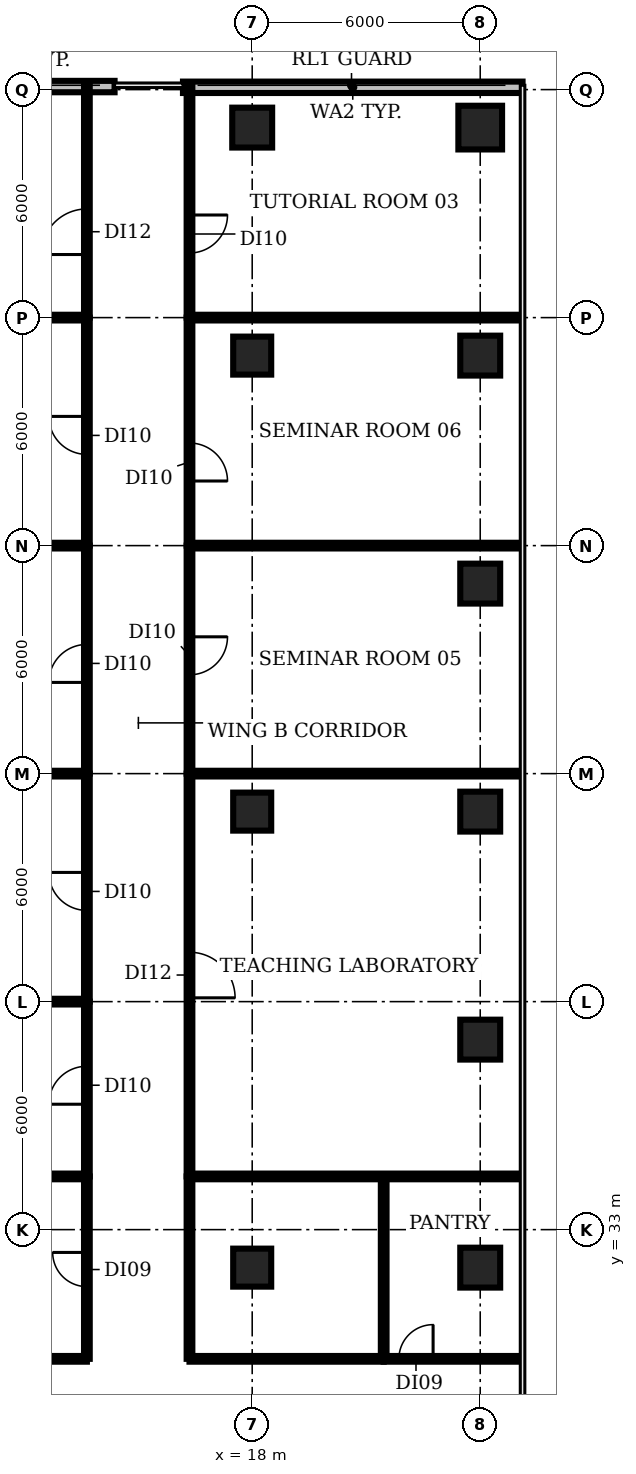
"""IFC4 building model, lengths in metres.
Left out: names, types, materials, properties, quantities, classifications, styles, units other than length and angle.
Written with IfcOpenShell. Run it as: python <this file> out.ifc"""

import sys

from ifc_helpers import new_model, si_unit, direction, frame, frame_2d, origin, origin_2d, place, context, subcontext, project, spatial, rectangle, circle, extrude, element, fill, save


model = new_model("IFC4")
c1 = context("Model", 3, precision=1e-05, world=origin(), true_north=direction((0.0, 1.0)))
c2 = subcontext(c1, "Body", "Model", "MODEL_VIEW")
j1 = project(units=[si_unit("LENGTHUNIT", "METRE"), si_unit("PLANEANGLEUNIT", "RADIAN")], contexts=[c1])
p1 = place(None, origin())
s1 = spatial("IfcSite", under=j1, at=p1, CompositionType="ELEMENT")
p2 = place(p1, origin())
s2 = spatial("IfcBuilding", under=s1, at=p2, CompositionType="ELEMENT")
p3 = place(p2, frame((0.0, 0.0, 75.2)))
s3 = spatial("IfcBuildingStorey", under=s2, at=p3, CompositionType="ELEMENT", Elevation=75.2)
for number, where, z_axis, x_axis in (
    (1, (18.0, 32.0, 0.0), (0.0, 0.0, 1.0), (1.0, 0.0, 0.0)),
    (2, (18.0, 44.0, 0.0), (0.0, 0.0, 1.0), (1.0, 0.0, 0.0)),
    (3, (18.0, 56.0, 0.0), (0.0, 0.0, 1.0), (1.0, 0.0, 0.0)),
):
    element("IfcColumn", number, at=place(p3, frame(where, z_axis=z_axis, x_axis=x_axis)), inside=s3, PredefinedType="COLUMN", context=c2, shape_type="SweptSolid", body=[
        extrude(rectangle(XDim=1.0, YDim=1.0, at=origin_2d()), origin(), (0.0, 0.0, 1.0), 3.2),
    ])
for number, where, z_axis, x_axis in (
    (4, (18.0, 62.0, 0.0), (0.0, 0.0, 1.0), (1.0, 0.0, 0.0)),
    (5, (24.0, 32.0, 0.0), (0.0, 0.0, 1.0), (1.0, 0.0, 0.0)),
    (6, (24.0, 38.0, 0.0), (0.0, 0.0, 1.0), (1.0, 0.0, 0.0)),
    (7, (24.0, 44.0, 0.0), (0.0, 0.0, 1.0), (1.0, 0.0, 0.0)),
    (8, (24.0, 50.0, 0.0), (0.0, 0.0, 1.0), (1.0, 0.0, 0.0)),
    (9, (24.0, 56.0, 0.0), (0.0, 0.0, 1.0), (1.0, 0.0, 0.0)),
):
    element("IfcColumn", number, at=place(p3, frame(where, z_axis=z_axis, x_axis=x_axis)), inside=s3, PredefinedType="COLUMN", context=c2, shape_type="SweptSolid", body=[
        extrude(rectangle(XDim=1.05, YDim=1.05, at=origin_2d()), origin(), (0.0, 0.0, 1.0), 3.2),
    ])
p4 = place(p3, frame((24.0, 62.0, 0.0), z_axis=(0.0, 0.0, 1.0), x_axis=(1.0, 0.0, 0.0)))
e10 = element("IfcColumn", 10, at=p4, inside=s3, PredefinedType="COLUMN", context=c2, shape_type="SweptSolid", body=[
    extrude(circle(Radius=0.575, at=origin_2d()), origin(), (0.0, 0.0, 1.0), 3.2),
])
p5 = place(p3, frame((25.114, 63.061, 0.0), z_axis=(0.0, 0.0, 1.0), x_axis=(-1.0, 0.0, 0.0)))
e11 = element("IfcWall", 11, at=p5, inside=s3, PredefinedType="SOLIDWALL", context=c2, shape_type="SweptSolid", body=[
    extrude(rectangle(XDim=8.936, YDim=0.3, at=frame_2d((4.468, 0.0))), origin(), (0.0, 0.0, 1.0), 3.8),
])
p6 = place(p3, frame((14.378, 63.08, 0.0), z_axis=(0.0, 0.0, 1.0), x_axis=(-1.0, 0.0, 0.0)))
e12 = element("IfcWall", 12, at=p6, inside=s3, PredefinedType="SOLIDWALL", context=c2, shape_type="SweptSolid", body=[
    extrude(rectangle(XDim=4.757, YDim=0.3, at=frame_2d((2.378, 0.0))), origin(), (0.0, 0.0, 1.0), 3.8),
])
p7 = place(p3, frame((-4.35, 57.0, 0.0), z_axis=(0.0, 0.0, 1.0), x_axis=(1.0, 0.0, 0.0)))
e13 = element("IfcWall", 13, at=p7, inside=s3, PredefinedType="PARTITIONING", context=c2, shape_type="SweptSolid", body=[
    extrude(rectangle(XDim=18.0, YDim=0.15, at=frame_2d((9.0, 0.0))), origin(), (0.0, 0.0, 1.0), 2.78),
])
p8 = place(p3, frame((-3.77, 51.0, 0.0), z_axis=(0.0, 0.0, 1.0), x_axis=(1.0, 0.0, 0.0)))
e14 = element("IfcWall", 14, at=p8, inside=s3, PredefinedType="PARTITIONING", context=c2, shape_type="SweptSolid", body=[
    extrude(rectangle(XDim=17.42, YDim=0.15, at=frame_2d((8.71, 0.0))), origin(), (0.0, 0.0, 1.0), 2.78),
])
p9 = place(p3, frame((-3.19, 45.0, 0.0), z_axis=(0.0, 0.0, 1.0), x_axis=(1.0, 0.0, 0.0)))
e15 = element("IfcWall", 15, at=p9, inside=s3, PredefinedType="PARTITIONING", context=c2, shape_type="SweptSolid", body=[
    extrude(rectangle(XDim=16.84, YDim=0.15, at=frame_2d((8.42, 0.0))), origin(), (0.0, 0.0, 1.0), 2.78),
])
p10 = place(p3, frame((-2.61, 39.0, 0.0), z_axis=(0.0, 0.0, 1.0), x_axis=(1.0, 0.0, 0.0)))
e16 = element("IfcWall", 16, at=p10, inside=s3, PredefinedType="PARTITIONING", context=c2, shape_type="SweptSolid", body=[
    extrude(rectangle(XDim=16.26, YDim=0.15, at=frame_2d((8.13, 0.0))), origin(), (0.0, 0.0, 1.0), 2.78),
])
p11 = place(p3, frame((-2.17, 34.4, 0.0), z_axis=(0.0, 0.0, 1.0), x_axis=(1.0, 0.0, 0.0)))
e17 = element("IfcWall", 17, at=p11, inside=s3, PredefinedType="PARTITIONING", context=c2, shape_type="SweptSolid", body=[
    extrude(rectangle(XDim=15.82, YDim=0.15, at=frame_2d((7.91, 0.0))), origin(), (0.0, 0.0, 1.0), 2.78),
])
p12 = place(p3, frame((8.8, 29.6, 0.0), z_axis=(0.0, 0.0, 1.0), x_axis=(1.0, 0.0, 0.0)))
e18 = element("IfcWall", 18, at=p12, inside=s3, PredefinedType="PARTITIONING", context=c2, shape_type="SweptSolid", body=[
    extrude(rectangle(XDim=4.85, YDim=0.15, at=frame_2d((2.425, 0.0))), origin(), (0.0, 0.0, 1.0), 2.78),
])
p13 = place(p3, frame((13.65, 29.6, 0.0), z_axis=(0.0, 0.0, 1.0), x_axis=(0.0, 1.0, 0.0)))
e19 = element("IfcWall", 19, at=p13, inside=s3, PredefinedType="PARTITIONING", context=c2, shape_type="SweptSolid", body=[
    extrude(rectangle(XDim=4.8, YDim=0.15, at=frame_2d((2.4, 0.0))), origin(), (0.0, 0.0, 1.0), 2.78),
])
p14 = place(p13, frame((1.9, 0.0, 0.0)))
e20 = element("IfcOpeningElement", 20, at=p14, cuts=e19, PredefinedType="OPENING", context=c2, shape_type="SweptSolid", body=[
    extrude(rectangle(XDim=0.9, YDim=2.1, at=frame_2d((0.45, 1.05))), frame((0.0, 0.085, 0.0), z_axis=(0.0, -1.0, 0.0), x_axis=(1.0, 0.0, 0.0)), (0.0, 0.0, 1.0), 0.17),
])
p15 = place(p3, frame((13.65, 34.4, 0.0), z_axis=(0.0, 0.0, 1.0), x_axis=(0.0, 1.0, 0.0)))
e21 = element("IfcWall", 21, at=p15, inside=s3, PredefinedType="PARTITIONING", context=c2, shape_type="SweptSolid", body=[
    extrude(rectangle(XDim=4.6, YDim=0.15, at=frame_2d((2.3, 0.0))), origin(), (0.0, 0.0, 1.0), 2.78),
])
p16 = place(p15, frame((1.9, 0.0, 0.0)))
e22 = element("IfcOpeningElement", 22, at=p16, cuts=e21, PredefinedType="OPENING", context=c2, shape_type="SweptSolid", body=[
    extrude(rectangle(XDim=1.0, YDim=2.1, at=frame_2d((0.5, 1.05))), frame((0.0, 0.085, 0.0), z_axis=(0.0, -1.0, 0.0), x_axis=(1.0, 0.0, 0.0)), (0.0, 0.0, 1.0), 0.17),
])
p17 = place(p3, frame((13.65, 39.0, 0.0), z_axis=(0.0, 0.0, 1.0), x_axis=(0.0, 1.0, 0.0)))
e23 = element("IfcWall", 23, at=p17, inside=s3, PredefinedType="PARTITIONING", context=c2, shape_type="SweptSolid", body=[
    extrude(rectangle(XDim=6.0, YDim=0.15, at=frame_2d((3.0, 0.0))), origin(), (0.0, 0.0, 1.0), 2.78),
])
p18 = place(p17, frame((2.4, 0.0, 0.0)))
e24 = element("IfcOpeningElement", 24, at=p18, cuts=e23, PredefinedType="OPENING", context=c2, shape_type="SweptSolid", body=[
    extrude(rectangle(XDim=1.0, YDim=2.1, at=frame_2d((0.5, 1.05))), frame((0.0, 0.085, 0.0), z_axis=(0.0, -1.0, 0.0), x_axis=(1.0, 0.0, 0.0)), (0.0, 0.0, 1.0), 0.17),
])
p19 = place(p3, frame((13.65, 45.0, 0.0), z_axis=(0.0, 0.0, 1.0), x_axis=(0.0, 1.0, 0.0)))
e25 = element("IfcWall", 25, at=p19, inside=s3, PredefinedType="PARTITIONING", context=c2, shape_type="SweptSolid", body=[
    extrude(rectangle(XDim=6.0, YDim=0.15, at=frame_2d((3.0, 0.0))), origin(), (0.0, 0.0, 1.0), 2.78),
])
p20 = place(p19, frame((2.4, 0.0, 0.0)))
e26 = element("IfcOpeningElement", 26, at=p20, cuts=e25, PredefinedType="OPENING", context=c2, shape_type="SweptSolid", body=[
    extrude(rectangle(XDim=1.0, YDim=2.1, at=frame_2d((0.5, 1.05))), frame((0.0, 0.085, 0.0), z_axis=(0.0, -1.0, 0.0), x_axis=(1.0, 0.0, 0.0)), (0.0, 0.0, 1.0), 0.17),
])
p21 = place(p3, frame((13.65, 51.0, 0.0), z_axis=(0.0, 0.0, 1.0), x_axis=(0.0, 1.0, 0.0)))
e27 = element("IfcWall", 27, at=p21, inside=s3, PredefinedType="PARTITIONING", context=c2, shape_type="SweptSolid", body=[
    extrude(rectangle(XDim=6.0, YDim=0.15, at=frame_2d((3.0, 0.0))), origin(), (0.0, 0.0, 1.0), 2.78),
])
p22 = place(p21, frame((2.4, 0.0, 0.0)))
e28 = element("IfcOpeningElement", 28, at=p22, cuts=e27, PredefinedType="OPENING", context=c2, shape_type="SweptSolid", body=[
    extrude(rectangle(XDim=1.0, YDim=2.1, at=frame_2d((0.5, 1.05))), frame((0.0, 0.085, 0.0), z_axis=(0.0, -1.0, 0.0), x_axis=(1.0, 0.0, 0.0)), (0.0, 0.0, 1.0), 0.17),
])
p23 = place(p3, frame((13.65, 57.0, 0.0), z_axis=(0.0, 0.0, 1.0), x_axis=(0.0, 1.0, 0.0)))
e29 = element("IfcWall", 29, at=p23, inside=s3, PredefinedType="PARTITIONING", context=c2, shape_type="SweptSolid", body=[
    extrude(rectangle(XDim=6.174, YDim=0.15, at=frame_2d((3.087, 0.0))), origin(), (0.0, 0.0, 1.0), 2.78),
])
p24 = place(p23, frame((1.66, 0.0, 0.0)))
e30 = element("IfcOpeningElement", 30, at=p24, cuts=e29, PredefinedType="OPENING", context=c2, shape_type="SweptSolid", body=[
    extrude(rectangle(XDim=1.2, YDim=2.1, at=frame_2d((0.6, 1.05))), frame((0.0, 0.085, 0.0), z_axis=(0.0, -1.0, 0.0), x_axis=(1.0, 0.0, 0.0)), (0.0, 0.0, 1.0), 0.17),
])
p25 = place(p3, frame((16.35, 29.6, 0.0), z_axis=(0.0, 0.0, 1.0), x_axis=(0.0, 1.0, 0.0)))
e31 = element("IfcWall", 31, at=p25, inside=s3, PredefinedType="PARTITIONING", context=c2, shape_type="SweptSolid", body=[
    extrude(rectangle(XDim=4.8, YDim=0.15, at=frame_2d((2.4, 0.0))), origin(), (0.0, 0.0, 1.0), 2.78),
])
p26 = place(p3, frame((16.35, 29.6, 0.0), z_axis=(0.0, 0.0, 1.0), x_axis=(1.0, 0.0, 0.0)))
e32 = element("IfcWall", 32, at=p26, inside=s3, PredefinedType="PARTITIONING", context=c2, shape_type="SweptSolid", body=[
    extrude(rectangle(XDim=5.11, YDim=0.15, at=frame_2d((2.555, 0.0))), origin(), (0.0, 0.0, 1.0), 2.78),
])
p27 = place(p3, frame((16.35, 34.4, 0.0), z_axis=(0.0, 0.0, 1.0), x_axis=(1.0, 0.0, 0.0)))
e33 = element("IfcWall", 33, at=p27, inside=s3, PredefinedType="PARTITIONING", context=c2, shape_type="SweptSolid", body=[
    extrude(rectangle(XDim=8.71, YDim=0.15, at=frame_2d((4.355, 0.0))), origin(), (0.0, 0.0, 1.0), 2.78),
])
p28 = place(p3, frame((16.35, 45.0, 0.0), z_axis=(0.0, 0.0, 1.0), x_axis=(0.0, -1.0, 0.0)))
e34 = element("IfcWall", 34, at=p28, inside=s3, PredefinedType="PARTITIONING", context=c2, shape_type="SweptSolid", body=[
    extrude(rectangle(XDim=10.6, YDim=0.15, at=frame_2d((5.3, 0.0))), origin(), (0.0, 0.0, 1.0), 2.78),
])
p29 = place(p28, frame((4.7, 0.0, 0.0)))
e35 = element("IfcOpeningElement", 35, at=p29, cuts=e34, PredefinedType="OPENING", context=c2, shape_type="SweptSolid", body=[
    extrude(rectangle(XDim=1.2, YDim=2.1, at=frame_2d((0.6, 1.05))), frame((0.0, 0.085, 0.0), z_axis=(0.0, -1.0, 0.0), x_axis=(1.0, 0.0, 0.0)), (0.0, 0.0, 1.0), 0.17),
])
p30 = place(p3, frame((16.35, 45.0, 0.0), z_axis=(0.0, 0.0, 1.0), x_axis=(1.0, 0.0, 0.0)))
e36 = element("IfcWall", 36, at=p30, inside=s3, PredefinedType="PARTITIONING", context=c2, shape_type="SweptSolid", body=[
    extrude(rectangle(XDim=8.71, YDim=0.15, at=frame_2d((4.355, 0.0))), origin(), (0.0, 0.0, 1.0), 2.78),
])
p31 = place(p3, frame((16.35, 51.0, 0.0), z_axis=(0.0, 0.0, 1.0), x_axis=(0.0, -1.0, 0.0)))
e37 = element("IfcWall", 37, at=p31, inside=s3, PredefinedType="PARTITIONING", context=c2, shape_type="SweptSolid", body=[
    extrude(rectangle(XDim=6.0, YDim=0.15, at=frame_2d((3.0, 0.0))), origin(), (0.0, 0.0, 1.0), 2.78),
])
p32 = place(p31, frame((2.4, 0.0, 0.0)))
e38 = element("IfcOpeningElement", 38, at=p32, cuts=e37, PredefinedType="OPENING", context=c2, shape_type="SweptSolid", body=[
    extrude(rectangle(XDim=1.0, YDim=2.1, at=frame_2d((0.5, 1.05))), frame((0.0, 0.085, 0.0), z_axis=(0.0, -1.0, 0.0), x_axis=(1.0, 0.0, 0.0)), (0.0, 0.0, 1.0), 0.17),
])
p33 = place(p3, frame((16.35, 51.0, 0.0), z_axis=(0.0, 0.0, 1.0), x_axis=(1.0, 0.0, 0.0)))
e39 = element("IfcWall", 39, at=p33, inside=s3, PredefinedType="PARTITIONING", context=c2, shape_type="SweptSolid", body=[
    extrude(rectangle(XDim=8.699, YDim=0.15, at=frame_2d((4.35, 0.0))), origin(), (0.0, 0.0, 1.0), 2.78),
])
p34 = place(p3, frame((16.35, 57.0, 0.0), z_axis=(0.0, 0.0, 1.0), x_axis=(0.0, -1.0, 0.0)))
e40 = element("IfcWall", 40, at=p34, inside=s3, PredefinedType="PARTITIONING", context=c2, shape_type="SweptSolid", body=[
    extrude(rectangle(XDim=6.0, YDim=0.15, at=frame_2d((3.0, 0.0))), origin(), (0.0, 0.0, 1.0), 2.78),
])
p35 = place(p34, frame((3.3, 0.0, 0.0)))
e41 = element("IfcOpeningElement", 41, at=p35, cuts=e40, PredefinedType="OPENING", context=c2, shape_type="SweptSolid", body=[
    extrude(rectangle(XDim=1.0, YDim=2.1, at=frame_2d((0.5, 1.05))), frame((0.0, 0.085, 0.0), z_axis=(0.0, -1.0, 0.0), x_axis=(1.0, 0.0, 0.0)), (0.0, 0.0, 1.0), 0.17),
])
p36 = place(p3, frame((16.35, 57.0, 0.0), z_axis=(0.0, 0.0, 1.0), x_axis=(1.0, 0.0, 0.0)))
e42 = element("IfcWall", 42, at=p36, inside=s3, PredefinedType="PARTITIONING", context=c2, shape_type="SweptSolid", body=[
    extrude(rectangle(XDim=8.699, YDim=0.15, at=frame_2d((4.35, 0.0))), origin(), (0.0, 0.0, 1.0), 2.78),
])
p37 = place(p3, frame((16.35, 63.174, 0.0), z_axis=(0.0, 0.0, 1.0), x_axis=(0.0, -1.0, 0.0)))
e43 = element("IfcWall", 43, at=p37, inside=s3, PredefinedType="PARTITIONING", context=c2, shape_type="SweptSolid", body=[
    extrude(rectangle(XDim=6.174, YDim=0.15, at=frame_2d((3.087, 0.0))), origin(), (0.0, 0.0, 1.0), 2.78),
])
p38 = place(p37, frame((3.474, 0.0, 0.0)))
e44 = element("IfcOpeningElement", 44, at=p38, cuts=e43, PredefinedType="OPENING", context=c2, shape_type="SweptSolid", body=[
    extrude(rectangle(XDim=1.0, YDim=2.1, at=frame_2d((0.5, 1.05))), frame((0.0, 0.085, 0.0), z_axis=(0.0, -1.0, 0.0), x_axis=(1.0, 0.0, 0.0)), (0.0, 0.0, 1.0), 0.17),
])
p39 = place(p3, frame((21.46, 29.6, 0.0), z_axis=(0.0, 0.0, 1.0), x_axis=(0.0, 1.0, 0.0)))
e45 = element("IfcWall", 45, at=p39, inside=s3, PredefinedType="PARTITIONING", context=c2, shape_type="SweptSolid", body=[
    extrude(rectangle(XDim=4.8, YDim=0.15, at=frame_2d((2.4, 0.0))), origin(), (0.0, 0.0, 1.0), 2.78),
])
p40 = place(p3, frame((21.46, 29.6, 0.0), z_axis=(0.0, 0.0, 1.0), x_axis=(1.0, 0.0, 0.0)))
e46 = element("IfcWall", 46, at=p40, inside=s3, PredefinedType="PARTITIONING", context=c2, shape_type="SweptSolid", body=[
    extrude(rectangle(XDim=3.6, YDim=0.15, at=frame_2d((1.8, 0.0))), origin(), (0.0, 0.0, 1.0), 2.78),
])
p41 = place(p40, frame((0.4, 0.0, 0.0)))
e47 = element("IfcOpeningElement", 47, at=p41, cuts=e46, PredefinedType="OPENING", context=c2, shape_type="SweptSolid", body=[
    extrude(rectangle(XDim=0.9, YDim=2.1, at=frame_2d((0.45, 1.05))), frame((0.0, 0.085, 0.0), z_axis=(0.0, -1.0, 0.0), x_axis=(1.0, 0.0, 0.0)), (0.0, 0.0, 1.0), 0.17),
])
p42 = place(p14, origin())
e48 = element("IfcDoor", 48, at=p42, inside=s3, OperationType="SINGLE_SWING_RIGHT", PredefinedType="DOOR", context=c2, shape_type="SweptSolid", body=[
    extrude(rectangle(XDim=0.9, YDim=2.1, at=frame_2d((0.45, 1.05))), frame((0.0, 0.025, 0.0), z_axis=(0.0, -1.0, 0.0), x_axis=(1.0, 0.0, 0.0)), (0.0, 0.0, 1.0), 0.05),
])
fill(e20, e48)
p43 = place(p16, origin())
e49 = element("IfcDoor", 49, at=p43, inside=s3, OperationType="SINGLE_SWING_LEFT", PredefinedType="DOOR", context=c2, shape_type="SweptSolid", body=[
    extrude(rectangle(XDim=1.0, YDim=2.1, at=frame_2d((0.5, 1.05))), frame((0.0, 0.025, 0.0), z_axis=(0.0, -1.0, 0.0), x_axis=(1.0, 0.0, 0.0)), (0.0, 0.0, 1.0), 0.05),
])
fill(e22, e49)
p44 = place(p18, origin())
e50 = element("IfcDoor", 50, at=p44, inside=s3, OperationType="SINGLE_SWING_RIGHT", PredefinedType="DOOR", context=c2, shape_type="SweptSolid", body=[
    extrude(rectangle(XDim=1.0, YDim=2.1, at=frame_2d((0.5, 1.05))), frame((0.0, 0.025, 0.0), z_axis=(0.0, -1.0, 0.0), x_axis=(1.0, 0.0, 0.0)), (0.0, 0.0, 1.0), 0.05),
])
fill(e24, e50)
p45 = place(p20, origin())
e51 = element("IfcDoor", 51, at=p45, inside=s3, OperationType="SINGLE_SWING_LEFT", PredefinedType="DOOR", context=c2, shape_type="SweptSolid", body=[
    extrude(rectangle(XDim=1.0, YDim=2.1, at=frame_2d((0.5, 1.05))), frame((0.0, 0.025, 0.0), z_axis=(0.0, -1.0, 0.0), x_axis=(1.0, 0.0, 0.0)), (0.0, 0.0, 1.0), 0.05),
])
fill(e26, e51)
p46 = place(p22, origin())
e52 = element("IfcDoor", 52, at=p46, inside=s3, OperationType="SINGLE_SWING_RIGHT", PredefinedType="DOOR", context=c2, shape_type="SweptSolid", body=[
    extrude(rectangle(XDim=1.0, YDim=2.1, at=frame_2d((0.5, 1.05))), frame((0.0, 0.025, 0.0), z_axis=(0.0, -1.0, 0.0), x_axis=(1.0, 0.0, 0.0)), (0.0, 0.0, 1.0), 0.05),
])
fill(e28, e52)
p47 = place(p24, origin())
e53 = element("IfcDoor", 53, at=p47, inside=s3, OperationType="SINGLE_SWING_LEFT", PredefinedType="DOOR", context=c2, shape_type="SweptSolid", body=[
    extrude(rectangle(XDim=1.2, YDim=2.1, at=frame_2d((0.6, 1.05))), frame((0.0, 0.025, 0.0), z_axis=(0.0, -1.0, 0.0), x_axis=(1.0, 0.0, 0.0)), (0.0, 0.0, 1.0), 0.05),
])
fill(e30, e53)
p48 = place(p29, origin())
e54 = element("IfcDoor", 54, at=p48, inside=s3, OperationType="SINGLE_SWING_RIGHT", PredefinedType="DOOR", context=c2, shape_type="SweptSolid", body=[
    extrude(rectangle(XDim=1.2, YDim=2.1, at=frame_2d((0.6, 1.05))), frame((0.0, 0.025, 0.0), z_axis=(0.0, -1.0, 0.0), x_axis=(1.0, 0.0, 0.0)), (0.0, 0.0, 1.0), 0.05),
])
fill(e35, e54)
p49 = place(p32, origin())
e55 = element("IfcDoor", 55, at=p49, inside=s3, OperationType="SINGLE_SWING_LEFT", PredefinedType="DOOR", context=c2, shape_type="SweptSolid", body=[
    extrude(rectangle(XDim=1.0, YDim=2.1, at=frame_2d((0.5, 1.05))), frame((0.0, 0.025, 0.0), z_axis=(0.0, -1.0, 0.0), x_axis=(1.0, 0.0, 0.0)), (0.0, 0.0, 1.0), 0.05),
])
fill(e38, e55)
p50 = place(p35, origin())
e56 = element("IfcDoor", 56, at=p50, inside=s3, OperationType="SINGLE_SWING_RIGHT", PredefinedType="DOOR", context=c2, shape_type="SweptSolid", body=[
    extrude(rectangle(XDim=1.0, YDim=2.1, at=frame_2d((0.5, 1.05))), frame((0.0, 0.025, 0.0), z_axis=(0.0, -1.0, 0.0), x_axis=(1.0, 0.0, 0.0)), (0.0, 0.0, 1.0), 0.05),
])
fill(e41, e56)
p51 = place(p38, origin())
e57 = element("IfcDoor", 57, at=p51, inside=s3, OperationType="SINGLE_SWING_LEFT", PredefinedType="DOOR", context=c2, shape_type="SweptSolid", body=[
    extrude(rectangle(XDim=1.0, YDim=2.1, at=frame_2d((0.5, 1.05))), frame((0.0, 0.025, 0.0), z_axis=(0.0, -1.0, 0.0), x_axis=(1.0, 0.0, 0.0)), (0.0, 0.0, 1.0), 0.05),
])
fill(e44, e57)
p52 = place(p41, origin())
e58 = element("IfcDoor", 58, at=p52, inside=s3, OperationType="SINGLE_SWING_RIGHT", PredefinedType="DOOR", context=c2, shape_type="SweptSolid", body=[
    extrude(rectangle(XDim=0.9, YDim=2.1, at=frame_2d((0.45, 1.05))), frame((0.0, 0.025, 0.0), z_axis=(0.0, -1.0, 0.0), x_axis=(1.0, 0.0, 0.0)), (0.0, 0.0, 1.0), 0.05),
])
fill(e47, e58)
save(model, sys.argv[1])
